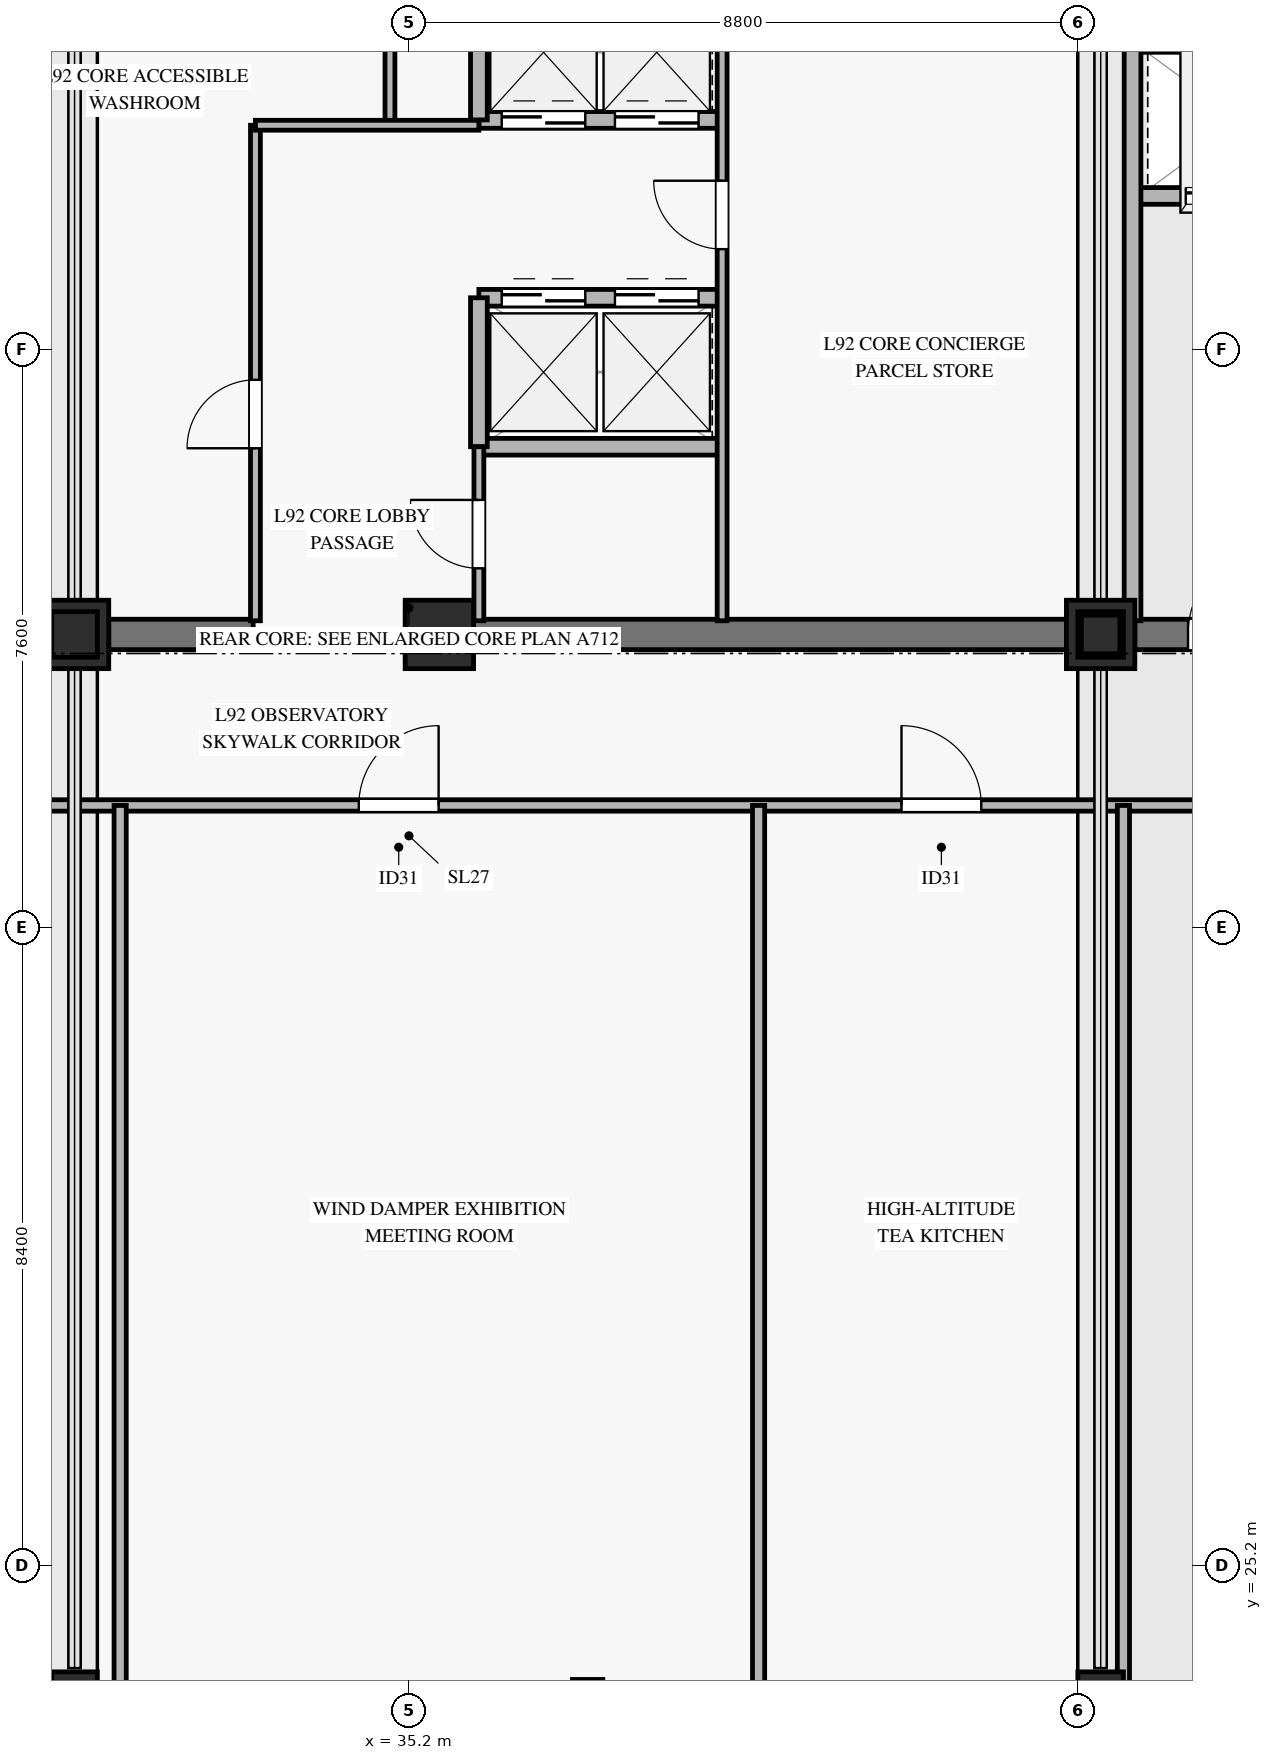
"""IFC4 building model, lengths in metres.
Left out: names, types, materials, properties, quantities, classifications, styles, units other than length and angle.
Written with IfcOpenShell. Run it as: python <this file> out.ifc"""

import sys

from ifc_helpers import new_model, si_unit, direction, frame, frame_2d, origin, origin_2d, place, context, subcontext, project, spatial, rectangle, hollow_rectangle, hollow_circle, extrude, source, transform, mapped, element, fill, save


model = new_model("IFC4")
c1 = context("Model", 3, precision=1e-05, world=origin(), true_north=direction((0.0, 1.0)))
c2 = subcontext(c1, "Body", "Model", "MODEL_VIEW")
j1 = project(units=[si_unit("LENGTHUNIT", "METRE"), si_unit("PLANEANGLEUNIT", "RADIAN")], contexts=[c1])
p1 = place(None, origin())
s1 = spatial("IfcSite", under=j1, at=p1, CompositionType="ELEMENT")
p2 = place(p1, origin())
s2 = spatial("IfcBuilding", under=s1, at=p2, CompositionType="ELEMENT")
p3 = place(p2, frame((0.0, 0.0, 352.7)))
s3 = spatial("IfcBuildingStorey", under=s2, at=p3, CompositionType="ELEMENT", Elevation=352.7)
m1 = source(origin(), c2, "Body", "SweptSolid", [
    extrude(rectangle(XDim=0.9, YDim=0.9, at=origin_2d()), origin(), (0.0, 0.0, 1.0), 6.16),
])
for number, where, z_axis, x_axis in (
    (1, (30.8, 37.45, 0.0), (0.0, 0.0, 1.0), (1.0, 0.0, 0.0)),
    (2, (35.6, 37.45, 0.0), (0.0, 0.0, 1.0), (1.0, 0.0, 0.0)),
    (3, (44.3, 37.45, 0.0), (0.0, 0.0, 1.0), (1.0, 0.0, 0.0)),
):
    element("IfcColumn", number, at=place(p3, frame(where, z_axis=z_axis, x_axis=x_axis)), inside=s3, PredefinedType="PILASTER", context=c2, shape_type="MappedRepresentation", body=[
        mapped(m1, transform((0.0, 0.0, 0.0), x_axis=(1.0, 0.0, 0.0), y_axis=(0.0, 1.0, 0.0), z_axis=(0.0, 0.0, 1.0), scale=1.0)),
    ])
p4 = place(p3, frame((31.25, 37.45, 0.0), z_axis=(0.0, 0.0, 1.0), x_axis=(1.0, 0.0, 0.0)))
e4 = element("IfcWall", 4, at=p4, inside=s3, PredefinedType="SHEAR", context=c2, shape_type="SweptSolid", body=[
    extrude(rectangle(XDim=1.9, YDim=0.4, at=frame_2d((0.95, 0.0))), origin(), (0.0, 0.0, 1.0), 6.16),
])
p5 = place(p3, frame((36.05, 37.45, 0.0), z_axis=(0.0, 0.0, 1.0), x_axis=(1.0, 0.0, 0.0)))
e5 = element("IfcWall", 5, at=p5, inside=s3, PredefinedType="SHEAR", context=c2, shape_type="SweptSolid", body=[
    extrude(rectangle(XDim=7.8, YDim=0.4, at=frame_2d((3.9, 0.0))), origin(), (0.0, 0.0, 1.0), 6.16),
])
p6 = place(p3, frame((44.75, 37.45, 0.0), z_axis=(0.0, 0.0, 1.0), x_axis=(1.0, 0.0, 0.0)))
e6 = element("IfcWall", 6, at=p6, inside=s3, PredefinedType="SHEAR", context=c2, shape_type="SweptSolid", body=[
    extrude(rectangle(XDim=5.35, YDim=0.4, at=frame_2d((2.675, 0.0))), origin(), (0.0, 0.0, 1.0), 6.16),
])
p7 = place(p6, frame((0.7, 0.0, 0.0)))
e7 = element("IfcOpeningElement", 7, at=p7, cuts=e6, PredefinedType="OPENING", context=c2, shape_type="SweptSolid", body=[
    extrude(rectangle(XDim=1.2, YDim=2.15, at=frame_2d((0.6, 1.075))), frame((0.0, 0.21, 0.0), z_axis=(0.0, -1.0, 0.0), x_axis=(1.0, 0.0, 0.0)), (0.0, 0.0, 1.0), 0.42),
])
m2 = source(origin(), c2, "Body", "SweptSolid", [
    extrude(hollow_rectangle(XDim=0.6, YDim=0.6, WallThickness=0.028, at=origin_2d()), origin(), (0.0, 0.0, 1.0), 21.147),
])
for number, where, z_axis, x_axis in (
    (8, (30.8, 23.5, 6.4), (0.0, 0.0, 1.0), (1.0, 0.0, 0.0)),
    (9, (30.8, 37.45, 6.4), (0.0, 0.0, 1.0), (1.0, 0.0, 0.0)),
):
    element("IfcColumn", number, at=place(p3, frame(where, z_axis=z_axis, x_axis=x_axis)), inside=s3, PredefinedType="COLUMN", context=c2, shape_type="MappedRepresentation", body=[
        mapped(m2, transform((0.0, 0.0, 0.0), x_axis=(1.0, 0.0, 0.0), y_axis=(0.0, 1.0, 0.0), z_axis=(0.0, 0.0, 1.0), scale=1.0)),
    ])
m3 = source(origin(), c2, "Body", "SweptSolid", [
    extrude(hollow_rectangle(XDim=0.6, YDim=0.6, WallThickness=0.028, at=origin_2d()), origin(), (0.0, 0.0, 1.0), 32.096),
])
for number, where, z_axis, x_axis in (
    (10, (44.3, 23.5, 6.4), (0.0, 0.0, 1.0), (1.0, 0.0, 0.0)),
    (11, (44.3, 37.45, 6.4), (0.0, 0.0, 1.0), (1.0, 0.0, 0.0)),
):
    element("IfcColumn", number, at=place(p3, frame(where, z_axis=z_axis, x_axis=x_axis)), inside=s3, PredefinedType="COLUMN", context=c2, shape_type="MappedRepresentation", body=[
        mapped(m3, transform((0.0, 0.0, 0.0), x_axis=(1.0, 0.0, 0.0), y_axis=(0.0, 1.0, 0.0), z_axis=(0.0, 0.0, 1.0), scale=1.0)),
    ])
m4 = source(origin(), c2, "Body", "SweptSolid", [
    extrude(hollow_circle(Radius=0.254, WallThickness=0.024, at=origin_2d()), origin(), (0.0, 0.0, 1.0), 1.704),
])
p8 = place(p3, frame((44.3, 37.45, 38.496), z_axis=(0.0, 0.0, 1.0), x_axis=(1.0, 0.0, 0.0)))
e12 = element("IfcColumn", 12, at=p8, inside=s3, PredefinedType="COLUMN", context=c2, shape_type="MappedRepresentation", body=[
    mapped(m4, transform((0.0, 0.0, 0.0), x_axis=(1.0, 0.0, 0.0), y_axis=(0.0, 1.0, 0.0), z_axis=(0.0, 0.0, 1.0), scale=1.0)),
])
p9 = place(p3, frame((44.72, 43.22, 0.0), z_axis=(0.0, 0.0, 1.0), x_axis=(1.0, 0.0, 0.0)))
e13 = element("IfcWall", 13, at=p9, inside=s3, PredefinedType="SOLIDWALL", context=c2, shape_type="SweptSolid", body=[
    extrude(rectangle(XDim=2.72, YDim=0.22, at=frame_2d((1.36, 0.0))), origin(), (0.0, 0.0, 1.0), 6.16),
])
p10 = place(p9, frame((0.7, 0.0, 0.0)))
e14 = element("IfcOpeningElement", 14, at=p10, cuts=e13, PredefinedType="OPENING", context=c2, shape_type="SweptSolid", body=[
    extrude(rectangle(XDim=1.1, YDim=2.2, at=frame_2d((0.55, 1.1))), frame((0.0, 0.12, 0.0), z_axis=(0.0, -1.0, 0.0), x_axis=(1.0, 0.0, 0.0)), (0.0, 0.0, 1.0), 0.24),
])
p11 = place(p3, frame((44.72, 45.22, 0.0), z_axis=(0.0, 0.0, 1.0), x_axis=(1.0, 0.0, 0.0)))
e15 = element("IfcWall", 15, at=p11, inside=s3, PredefinedType="SOLIDWALL", context=c2, shape_type="SweptSolid", body=[
    extrude(rectangle(XDim=2.72, YDim=0.22, at=frame_2d((1.36, 0.0))), origin(), (0.0, 0.0, 1.0), 6.16),
])
p12 = place(p3, frame((44.72, 37.63, 0.0), z_axis=(0.0, 0.0, 1.0), x_axis=(0.0, 1.0, 0.0)))
e16 = element("IfcWall", 16, at=p12, inside=s3, PredefinedType="SOLIDWALL", context=c2, shape_type="SweptSolid", body=[
    extrude(rectangle(XDim=7.59, YDim=0.22, at=frame_2d((3.795, 0.0))), origin(), (0.0, 0.0, 1.0), 6.16),
])
p13 = place(p3, frame((36.12, 44.22, 0.0), z_axis=(0.0, 0.0, 1.0), x_axis=(1.0, 0.0, 0.0)))
e17 = element("IfcWall", 17, at=p13, inside=s3, PredefinedType="SOLIDWALL", context=c2, shape_type="SweptSolid", body=[
    extrude(rectangle(XDim=3.2, YDim=0.22, at=frame_2d((1.6, 0.0))), origin(), (0.0, 0.0, 1.0), 6.16),
])
p14 = place(p13, frame((0.3, 0.0, 0.0)))
e18 = element("IfcOpeningElement", 18, at=p14, cuts=e17, PredefinedType="OPENING", context=c2, shape_type="SweptSolid", body=[
    extrude(rectangle(XDim=1.1, YDim=2.2, at=frame_2d((0.55, 1.1))), frame((0.0, 0.12, 0.0), z_axis=(0.0, -1.0, 0.0), x_axis=(1.0, 0.0, 0.0)), (0.0, 0.0, 1.0), 0.24),
])
p15 = place(p13, frame((1.79, 0.0, 0.0)))
e19 = element("IfcOpeningElement", 19, at=p15, cuts=e17, PredefinedType="OPENING", context=c2, shape_type="SweptSolid", body=[
    extrude(rectangle(XDim=1.1, YDim=2.2, at=frame_2d((0.55, 1.1))), frame((0.0, 0.12, 0.0), z_axis=(0.0, -1.0, 0.0), x_axis=(1.0, 0.0, 0.0)), (0.0, 0.0, 1.0), 0.24),
])
p16 = place(p3, frame((36.12, 41.88, 0.0), z_axis=(0.0, 0.0, 1.0), x_axis=(1.0, 0.0, 0.0)))
e20 = element("IfcWall", 20, at=p16, inside=s3, PredefinedType="SOLIDWALL", context=c2, shape_type="SweptSolid", body=[
    extrude(rectangle(XDim=3.2, YDim=0.22, at=frame_2d((1.6, 0.0))), origin(), (0.0, 0.0, 1.0), 6.16),
])
p17 = place(p16, frame((0.3, 0.0, 0.0)))
e21 = element("IfcOpeningElement", 21, at=p17, cuts=e20, PredefinedType="OPENING", context=c2, shape_type="SweptSolid", body=[
    extrude(rectangle(XDim=1.1, YDim=2.2, at=frame_2d((0.55, 1.1))), frame((0.0, 0.12, 0.0), z_axis=(0.0, -1.0, 0.0), x_axis=(1.0, 0.0, 0.0)), (0.0, 0.0, 1.0), 0.24),
])
p18 = place(p16, frame((1.79, 0.0, 0.0)))
e22 = element("IfcOpeningElement", 22, at=p18, cuts=e20, PredefinedType="OPENING", context=c2, shape_type="SweptSolid", body=[
    extrude(rectangle(XDim=1.1, YDim=2.2, at=frame_2d((0.55, 1.1))), frame((0.0, 0.12, 0.0), z_axis=(0.0, -1.0, 0.0), x_axis=(1.0, 0.0, 0.0)), (0.0, 0.0, 1.0), 0.24),
])
p19 = place(p3, frame((36.12, 39.92, 0.0), z_axis=(0.0, 0.0, 1.0), x_axis=(1.0, 0.0, 0.0)))
e23 = element("IfcWall", 23, at=p19, inside=s3, PredefinedType="SOLIDWALL", context=c2, shape_type="SweptSolid", body=[
    extrude(rectangle(XDim=3.2, YDim=0.22, at=frame_2d((1.6, 0.0))), origin(), (0.0, 0.0, 1.0), 6.16),
])
p20 = place(p3, frame((36.12, 39.92, 0.0), z_axis=(0.0, 0.0, 1.0), x_axis=(0.0, 1.0, 0.0)))
e24 = element("IfcWall", 24, at=p20, inside=s3, PredefinedType="SOLIDWALL", context=c2, shape_type="SweptSolid", body=[
    extrude(rectangle(XDim=1.96, YDim=0.22, at=frame_2d((0.98, 0.0))), origin(), (0.0, 0.0, 1.0), 6.16),
])
p21 = place(p3, frame((36.12, 44.22, 0.0), z_axis=(0.0, 0.0, 1.0), x_axis=(0.0, 1.0, 0.0)))
e25 = element("IfcWall", 25, at=p21, inside=s3, PredefinedType="SOLIDWALL", context=c2, shape_type="SweptSolid", body=[
    extrude(rectangle(XDim=2.15, YDim=0.22, at=frame_2d((1.075, 0.0))), origin(), (0.0, 0.0, 1.0), 6.16),
])
p22 = place(p3, frame((36.12, 37.63, 0.0), z_axis=(0.0, 0.0, 1.0), x_axis=(0.0, 1.0, 0.0)))
e26 = element("IfcWall", 26, at=p22, inside=s3, PredefinedType="PARTITIONING", context=c2, shape_type="SweptSolid", body=[
    extrude(rectangle(XDim=2.29, YDim=0.13, at=frame_2d((1.145, 0.0))), origin(), (0.0, 0.0, 1.0), 6.16),
])
p23 = place(p22, frame((0.69, 0.0, 0.0)))
e27 = element("IfcOpeningElement", 27, at=p23, cuts=e26, PredefinedType="OPENING", context=c2, shape_type="SweptSolid", body=[
    extrude(rectangle(XDim=0.9, YDim=2.1, at=frame_2d((0.45, 1.05))), frame((0.0, 0.075, 0.0), z_axis=(0.0, -1.0, 0.0), x_axis=(1.0, 0.0, 0.0)), (0.0, 0.0, 1.0), 0.15),
])
p24 = place(p3, frame((33.18, 37.63, 0.0), z_axis=(0.0, 0.0, 1.0), x_axis=(0.0, 1.0, 0.0)))
e28 = element("IfcWall", 28, at=p24, inside=s3, PredefinedType="PARTITIONING", context=c2, shape_type="SweptSolid", body=[
    extrude(rectangle(XDim=6.52, YDim=0.13, at=frame_2d((3.26, 0.0))), origin(), (0.0, 0.0, 1.0), 5.245),
])
p25 = place(p24, frame((2.27, 0.0, 0.0)))
e29 = element("IfcOpeningElement", 29, at=p25, cuts=e28, PredefinedType="OPENING", context=c2, shape_type="SweptSolid", body=[
    extrude(rectangle(XDim=0.9, YDim=2.1, at=frame_2d((0.45, 1.05))), frame((0.0, 0.075, 0.0), z_axis=(0.0, -1.0, 0.0), x_axis=(1.0, 0.0, 0.0)), (0.0, 0.0, 1.0), 0.15),
])
p26 = place(p3, frame((34.95, 44.15, 0.0), z_axis=(0.0, 0.0, 1.0), x_axis=(0.0, 1.0, 0.0)))
e30 = element("IfcWall", 30, at=p26, inside=s3, PredefinedType="PARTITIONING", context=c2, shape_type="SweptSolid", body=[
    extrude(rectangle(XDim=2.22, YDim=0.13, at=frame_2d((1.11, 0.0))), origin(), (0.0, 0.0, 1.0), 6.16),
])
p27 = place(p3, frame((33.18, 44.15, 0.0), z_axis=(0.0, 0.0, 1.0), x_axis=(1.0, 0.0, 0.0)))
e31 = element("IfcWall", 31, at=p27, inside=s3, PredefinedType="PARTITIONING", context=c2, shape_type="SweptSolid", body=[
    extrude(rectangle(XDim=2.94, YDim=0.13, at=frame_2d((1.47, 0.0))), origin(), (0.0, 0.0, 1.0), 5.445),
])
p28 = place(p3, frame((39.32, 37.63, 0.0), z_axis=(0.0, 0.0, 1.0), x_axis=(0.0, 1.0, 0.0)))
e32 = element("IfcWall", 32, at=p28, inside=s3, PredefinedType="PARTITIONING", context=c2, shape_type="SweptSolid", body=[
    extrude(rectangle(XDim=8.74, YDim=0.13, at=frame_2d((4.37, 0.0))), origin(), (0.0, 0.0, 1.0), 6.16),
])
p29 = place(p28, frame((4.89, 0.0, 0.0)))
e33 = element("IfcOpeningElement", 33, at=p29, cuts=e32, PredefinedType="OPENING", context=c2, shape_type="SweptSolid", body=[
    extrude(rectangle(XDim=0.9, YDim=2.1, at=frame_2d((0.45, 1.05))), frame((0.0, 0.075, 0.0), z_axis=(0.0, -1.0, 0.0), x_axis=(1.0, 0.0, 0.0)), (0.0, 0.0, 1.0), 0.15),
])
p30 = place(p3, frame((22.6, 35.2, 0.0), z_axis=(0.0, 0.0, 1.0), x_axis=(1.0, 0.0, 0.0)))
e34 = element("IfcWall", 34, at=p30, inside=s3, PredefinedType="PARTITIONING", context=c2, shape_type="SweptSolid", body=[
    extrude(rectangle(XDim=26.0, YDim=0.15, at=frame_2d((13.0, 0.0))), origin(), (0.0, 0.0, 1.0), 3.535),
])
p31 = place(p30, frame((3.28, 0.0, 0.0)))
e35 = element("IfcOpeningElement", 35, at=p31, cuts=e34, PredefinedType="OPENING", context=c2, shape_type="SweptSolid", body=[
    extrude(rectangle(XDim=1.05, YDim=2.15, at=frame_2d((0.525, 1.075))), frame((0.0, 0.085, 0.0), z_axis=(0.0, -1.0, 0.0), x_axis=(1.0, 0.0, 0.0)), (0.0, 0.0, 1.0), 0.17),
])
p32 = place(p30, frame((11.94, 0.0, 0.0)))
e36 = element("IfcOpeningElement", 36, at=p32, cuts=e34, PredefinedType="OPENING", context=c2, shape_type="SweptSolid", body=[
    extrude(rectangle(XDim=1.05, YDim=2.15, at=frame_2d((0.525, 1.075))), frame((0.0, 0.085, 0.0), z_axis=(0.0, -1.0, 0.0), x_axis=(1.0, 0.0, 0.0)), (0.0, 0.0, 1.0), 0.17),
])
p33 = place(p30, frame((19.08, 0.0, 0.0)))
e37 = element("IfcOpeningElement", 37, at=p33, cuts=e34, PredefinedType="OPENING", context=c2, shape_type="SweptSolid", body=[
    extrude(rectangle(XDim=1.05, YDim=2.15, at=frame_2d((0.525, 1.075))), frame((0.0, 0.085, 0.0), z_axis=(0.0, -1.0, 0.0), x_axis=(1.0, 0.0, 0.0)), (0.0, 0.0, 1.0), 0.17),
])
p34 = place(p30, frame((23.6, 0.0, 0.0)))
e38 = element("IfcOpeningElement", 38, at=p34, cuts=e34, PredefinedType="OPENING", context=c2, shape_type="SweptSolid", body=[
    extrude(rectangle(XDim=1.05, YDim=2.15, at=frame_2d((0.525, 1.075))), frame((0.0, 0.085, 0.0), z_axis=(0.0, -1.0, 0.0), x_axis=(1.0, 0.0, 0.0)), (0.0, 0.0, 1.0), 0.17),
])
for number, where, z_axis, x_axis in (
    (39, (31.4, 23.5, 0.0), (0.0, 0.0, 1.0), (0.0, 1.0, 0.0)),
    (40, (39.8, 23.5, 0.0), (0.0, 0.0, 1.0), (0.0, 1.0, 0.0)),
    (41, (44.6, 23.5, 0.0), (0.0, 0.0, 1.0), (0.0, 1.0, 0.0)),
):
    element("IfcWall", number, at=place(p3, frame(where, z_axis=z_axis, x_axis=x_axis)), inside=s3, PredefinedType="PARTITIONING", context=c2, shape_type="SweptSolid", body=[
        extrude(rectangle(XDim=11.7, YDim=0.16, at=frame_2d((5.85, 0.0))), origin(), (0.0, 0.0, 1.0), 3.535),
    ])
m5 = source(origin(), c2, "Body", "SweptSolid", [
    extrude(rectangle(XDim=1.1, YDim=2.2, at=frame_2d((0.55, 1.1))), frame((0.0, 0.025, 0.0), z_axis=(0.0, -1.0, 0.0), x_axis=(1.0, 0.0, 0.0)), (0.0, 0.0, 1.0), 0.05),
])
p35 = place(p10, origin())
e42 = element("IfcDoor", 42, at=p35, inside=s3, OperationType="SLIDING_TO_LEFT", PredefinedType="DOOR", context=c2, shape_type="MappedRepresentation", body=[
    mapped(m5, transform((0.0, 0.0, 0.0), x_axis=(1.0, 0.0, 0.0), y_axis=(0.0, 1.0, 0.0), z_axis=(0.0, 0.0, 1.0), scale=1.0)),
])
fill(e14, e42)
m6 = source(origin(), c2, "Body", "SweptSolid", [
    extrude(rectangle(XDim=1.2, YDim=2.15, at=frame_2d((0.6, 1.075))), frame((0.0, 0.025, 0.0), z_axis=(0.0, -1.0, 0.0), x_axis=(1.0, 0.0, 0.0)), (0.0, 0.0, 1.0), 0.05),
])
p36 = place(p7, origin())
e43 = element("IfcDoor", 43, at=p36, inside=s3, OperationType="SINGLE_SWING_RIGHT", PredefinedType="DOOR", context=c2, shape_type="MappedRepresentation", body=[
    mapped(m6, transform((0.0, 0.0, 0.0), x_axis=(1.0, 0.0, 0.0), y_axis=(0.0, 1.0, 0.0), z_axis=(0.0, 0.0, 1.0), scale=1.0)),
])
fill(e7, e43)
p37 = place(p14, origin())
e44 = element("IfcDoor", 44, at=p37, inside=s3, OperationType="SLIDING_TO_LEFT", PredefinedType="DOOR", context=c2, shape_type="MappedRepresentation", body=[
    mapped(m5, transform((0.0, 0.0, 0.0), x_axis=(1.0, 0.0, 0.0), y_axis=(0.0, 1.0, 0.0), z_axis=(0.0, 0.0, 1.0), scale=1.0)),
])
fill(e18, e44)
p38 = place(p15, origin())
e45 = element("IfcDoor", 45, at=p38, inside=s3, OperationType="SLIDING_TO_LEFT", PredefinedType="DOOR", context=c2, shape_type="MappedRepresentation", body=[
    mapped(m5, transform((0.0, 0.0, 0.0), x_axis=(1.0, 0.0, 0.0), y_axis=(0.0, 1.0, 0.0), z_axis=(0.0, 0.0, 1.0), scale=1.0)),
])
fill(e19, e45)
p39 = place(p17, origin())
e46 = element("IfcDoor", 46, at=p39, inside=s3, OperationType="SLIDING_TO_LEFT", PredefinedType="DOOR", context=c2, shape_type="MappedRepresentation", body=[
    mapped(m5, transform((0.0, 0.0, 0.0), x_axis=(1.0, 0.0, 0.0), y_axis=(0.0, 1.0, 0.0), z_axis=(0.0, 0.0, 1.0), scale=1.0)),
])
fill(e21, e46)
p40 = place(p18, origin())
e47 = element("IfcDoor", 47, at=p40, inside=s3, OperationType="SLIDING_TO_LEFT", PredefinedType="DOOR", context=c2, shape_type="MappedRepresentation", body=[
    mapped(m5, transform((0.0, 0.0, 0.0), x_axis=(1.0, 0.0, 0.0), y_axis=(0.0, 1.0, 0.0), z_axis=(0.0, 0.0, 1.0), scale=1.0)),
])
fill(e22, e47)
m7 = source(origin(), c2, "Body", "SweptSolid", [
    extrude(rectangle(XDim=0.9, YDim=2.1, at=frame_2d((0.45, 1.05))), frame((0.0, 0.025, 0.0), z_axis=(0.0, -1.0, 0.0), x_axis=(1.0, 0.0, 0.0)), (0.0, 0.0, 1.0), 0.05),
])
p41 = place(p23, origin())
e48 = element("IfcDoor", 48, at=p41, inside=s3, OperationType="SINGLE_SWING_RIGHT", PredefinedType="DOOR", context=c2, shape_type="MappedRepresentation", body=[
    mapped(m7, transform((0.0, 0.0, 0.0), x_axis=(1.0, 0.0, 0.0), y_axis=(0.0, 1.0, 0.0), z_axis=(0.0, 0.0, 1.0), scale=1.0)),
])
fill(e27, e48)
p42 = place(p25, origin())
e49 = element("IfcDoor", 49, at=p42, inside=s3, OperationType="SINGLE_SWING_LEFT", PredefinedType="DOOR", context=c2, shape_type="MappedRepresentation", body=[
    mapped(m7, transform((0.0, 0.0, 0.0), x_axis=(1.0, 0.0, 0.0), y_axis=(0.0, 1.0, 0.0), z_axis=(0.0, 0.0, 1.0), scale=1.0)),
])
fill(e29, e49)
p43 = place(p29, origin())
e50 = element("IfcDoor", 50, at=p43, inside=s3, OperationType="SINGLE_SWING_RIGHT", PredefinedType="DOOR", context=c2, shape_type="MappedRepresentation", body=[
    mapped(m7, transform((0.0, 0.0, 0.0), x_axis=(1.0, 0.0, 0.0), y_axis=(0.0, 1.0, 0.0), z_axis=(0.0, 0.0, 1.0), scale=1.0)),
])
fill(e33, e50)
m8 = source(origin(), c2, "Body", "SweptSolid", [
    extrude(rectangle(XDim=1.05, YDim=2.15, at=frame_2d((0.525, 1.075))), frame((0.0, 0.025, 0.0), z_axis=(0.0, -1.0, 0.0), x_axis=(1.0, 0.0, 0.0)), (0.0, 0.0, 1.0), 0.05),
])
p44 = place(p32, origin())
e51 = element("IfcDoor", 51, at=p44, inside=s3, OperationType="SINGLE_SWING_RIGHT", PredefinedType="DOOR", context=c2, shape_type="MappedRepresentation", body=[
    mapped(m8, transform((0.0, 0.0, 0.0), x_axis=(1.0, 0.0, 0.0), y_axis=(0.0, 1.0, 0.0), z_axis=(0.0, 0.0, 1.0), scale=1.0)),
])
fill(e36, e51)
p45 = place(p33, origin())
e52 = element("IfcDoor", 52, at=p45, inside=s3, OperationType="SINGLE_SWING_LEFT", PredefinedType="DOOR", context=c2, shape_type="MappedRepresentation", body=[
    mapped(m8, transform((0.0, 0.0, 0.0), x_axis=(1.0, 0.0, 0.0), y_axis=(0.0, 1.0, 0.0), z_axis=(0.0, 0.0, 1.0), scale=1.0)),
])
fill(e37, e52)
save(model, sys.argv[1])
